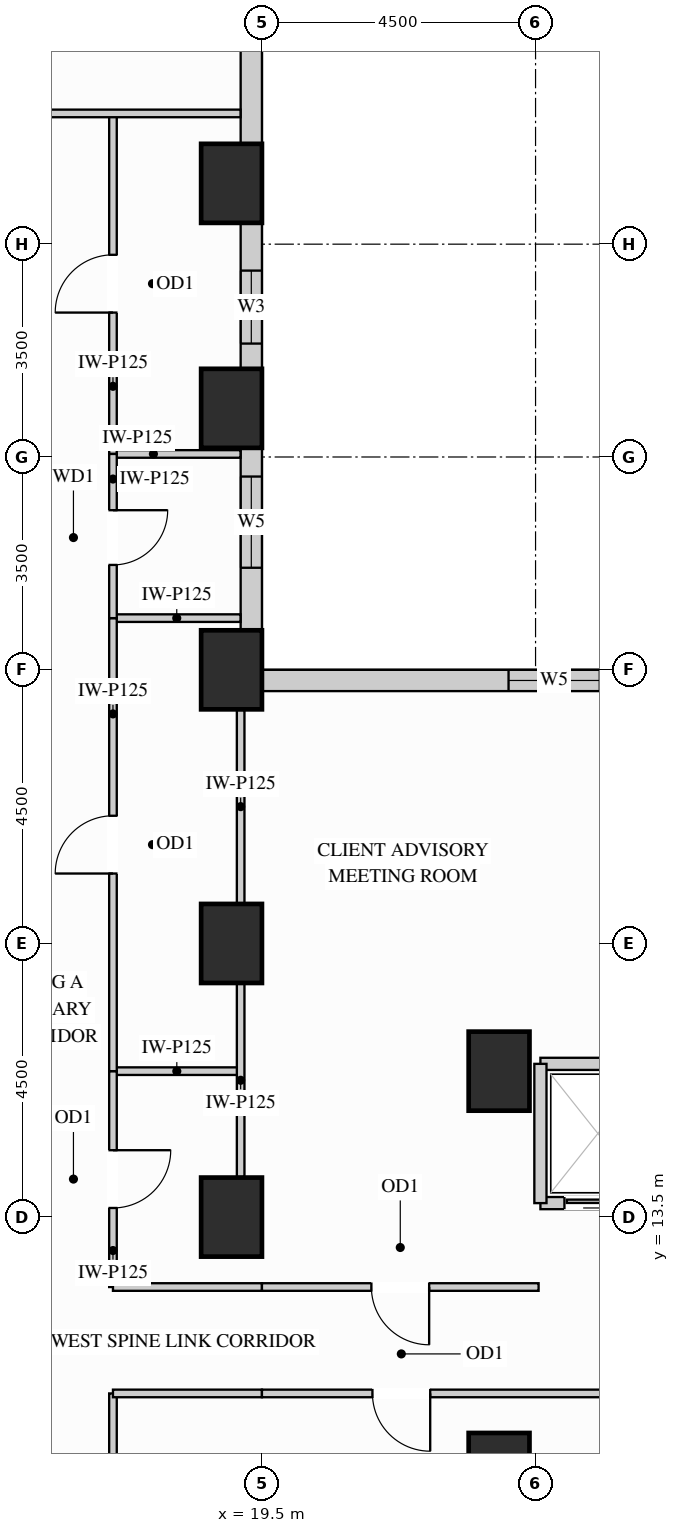
"""IFC4 building model, lengths in metres.
Left out: names, types, materials, properties, quantities, classifications, styles, units other than length and angle.
Written with IfcOpenShell. Run it as: python <this file> out.ifc"""

import sys

from ifc_helpers import new_model, si_unit, direction, frame, frame_2d, origin, origin_2d, place, context, subcontext, project, spatial, rectangle, extrude, source, transform, mapped, element, fill, save


model = new_model("IFC4")
c1 = context("Model", 3, precision=1e-05, world=origin(), true_north=direction((0.0, 1.0)))
c2 = subcontext(c1, "Body", "Model", "MODEL_VIEW")
j1 = project(units=[si_unit("LENGTHUNIT", "METRE"), si_unit("PLANEANGLEUNIT", "RADIAN")], contexts=[c1])
p1 = place(None, origin())
s1 = spatial("IfcSite", under=j1, at=p1, CompositionType="ELEMENT")
p2 = place(p1, origin())
s2 = spatial("IfcBuilding", under=s1, at=p2, CompositionType="ELEMENT")
p3 = place(p2, frame((0.0, 0.0, 62.1)))
s3 = spatial("IfcBuildingStorey", under=s2, at=p3, CompositionType="ELEMENT", Elevation=62.1)
m1 = source(origin(), c2, "Body", "SweptSolid", [
    extrude(rectangle(XDim=1.0, YDim=1.3, at=origin_2d()), origin(), (0.0, 0.0, 1.0), 3.38),
])
for number, where, z_axis, x_axis in (
    (1, (19.0, 13.5, 0.0), (0.0, 0.0, 1.0), (1.0, 0.0, 0.0)),
    (2, (19.0, 18.0, 0.0), (0.0, 0.0, 1.0), (1.0, 0.0, 0.0)),
    (3, (19.0, 22.5, 0.0), (0.0, 0.0, 1.0), (1.0, 0.0, 0.0)),
    (4, (19.0, 26.8, 0.0), (0.0, 0.0, 1.0), (1.0, 0.0, 0.0)),
    (5, (19.0, 30.5, 0.0), (0.0, 0.0, 1.0), (1.0, 0.0, 0.0)),
    (6, (23.4, 15.9, 0.0), (0.0, 0.0, 1.0), (1.0, 0.0, 0.0)),
    (7, (23.4, 9.3, 0.0), (0.0, 0.0, 1.0), (1.0, 0.0, 0.0)),
):
    element("IfcColumn", number, at=place(p3, frame(where, z_axis=z_axis, x_axis=x_axis)), inside=s3, PredefinedType="COLUMN", context=c2, shape_type="MappedRepresentation", body=[
        mapped(m1, transform((0.0, 0.0, 0.0), x_axis=(1.0, 0.0, 0.0), y_axis=(0.0, 1.0, 0.0), z_axis=(0.0, 0.0, 1.0))),
    ])
p4 = place(p3, frame((34.352, 22.325, 0.0), z_axis=(0.0, 0.0, 1.0), x_axis=(-1.0, 0.0, 0.0)))
e8 = element("IfcWall", 8, at=p4, inside=s3, PredefinedType="SOLIDWALL", context=c2, shape_type="SweptSolid", body=[
    extrude(rectangle(XDim=14.854, YDim=0.35, at=frame_2d((7.427, 0.0))), origin(), (0.0, 0.0, 1.0), 3.365),
])
p5 = place(p4, frame((4.058, 0.0, 0.78)))
e9 = element("IfcOpeningElement", 9, at=p5, cuts=e8, PredefinedType="OPENING", context=c2, shape_type="SweptSolid", body=[
    extrude(rectangle(XDim=1.5, YDim=2.0, at=frame_2d((0.75, 1.0))), frame((0.0, 0.185, 0.0), z_axis=(0.0, -1.0, 0.0), x_axis=(1.0, 0.0, 0.0)), (0.0, 0.0, 1.0), 0.37),
])
p6 = place(p4, frame((9.296, 0.0, 0.78)))
e10 = element("IfcOpeningElement", 10, at=p6, cuts=e8, PredefinedType="OPENING", context=c2, shape_type="SweptSolid", body=[
    extrude(rectangle(XDim=1.5, YDim=2.0, at=frame_2d((0.75, 1.0))), frame((0.0, 0.185, 0.0), z_axis=(0.0, -1.0, 0.0), x_axis=(1.0, 0.0, 0.0)), (0.0, 0.0, 1.0), 0.37),
])
p7 = place(p3, frame((19.325, 23.148, 0.0), z_axis=(0.0, 0.0, 1.0), x_axis=(0.0, 1.0, 0.0)))
e11 = element("IfcWall", 11, at=p7, inside=s3, PredefinedType="SOLIDWALL", context=c2, shape_type="SweptSolid", body=[
    extrude(rectangle(XDim=3.004, YDim=0.35, at=frame_2d((1.502, 0.0))), origin(), (0.0, 0.0, 1.0), 2.51),
])
p8 = place(p7, frame((1.031, 0.0, 0.78)))
e12 = element("IfcOpeningElement", 12, at=p8, cuts=e11, PredefinedType="OPENING", context=c2, shape_type="SweptSolid", body=[
    extrude(rectangle(XDim=1.5, YDim=1.55, at=frame_2d((0.75, 0.775))), frame((0.0, 0.185, 0.0), z_axis=(0.0, -1.0, 0.0), x_axis=(1.0, 0.0, 0.0)), (0.0, 0.0, 1.0), 0.37),
])
p9 = place(p3, frame((19.325, 27.448, 0.0), z_axis=(0.0, 0.0, 1.0), x_axis=(0.0, 1.0, 0.0)))
e13 = element("IfcWall", 13, at=p9, inside=s3, PredefinedType="SOLIDWALL", context=c2, shape_type="SweptSolid", body=[
    extrude(rectangle(XDim=2.404, YDim=0.35, at=frame_2d((1.202, 0.0))), origin(), (0.0, 0.0, 1.0), 2.51),
])
p10 = place(p9, frame((0.417, 0.0, 0.78)))
e14 = element("IfcOpeningElement", 14, at=p10, cuts=e13, PredefinedType="OPENING", context=c2, shape_type="SweptSolid", body=[
    extrude(rectangle(XDim=1.2, YDim=1.55, at=frame_2d((0.6, 0.775))), frame((0.0, 0.185, 0.0), z_axis=(0.0, -1.0, 0.0), x_axis=(1.0, 0.0, 0.0)), (0.0, 0.0, 1.0), 0.37),
])
m2 = source(origin(), c2, "Body", "SweptSolid", [
    extrude(rectangle(XDim=3.204, YDim=0.35, at=frame_2d((1.602, 0.0))), origin(), (0.0, 0.0, 1.0), 2.51),
])
p11 = place(p3, frame((19.325, 31.148, 0.0), z_axis=(0.0, 0.0, 1.0), x_axis=(0.0, 1.0, 0.0)))
e15 = element("IfcWall", 15, at=p11, inside=s3, PredefinedType="SOLIDWALL", context=c2, shape_type="MappedRepresentation", body=[
    mapped(m2, transform((0.0, 0.0, 0.0), x_axis=(1.0, 0.0, 0.0), y_axis=(0.0, 1.0, 0.0), z_axis=(0.0, 0.0, 1.0))),
])
m3 = source(origin(), c2, "Body", "SweptSolid", [
    extrude(rectangle(XDim=2.1, YDim=0.125, at=frame_2d((1.05, 0.0))), origin(), (0.0, 0.0, 1.0), 3.365),
])
p12 = place(p3, frame((17.05, 15.9, 0.0), z_axis=(0.0, 0.0, 1.0), x_axis=(1.0, 0.0, 0.0)))
e16 = element("IfcWall", 16, at=p12, inside=s3, PredefinedType="PARTITIONING", context=c2, shape_type="MappedRepresentation", body=[
    mapped(m3, transform((0.0, 0.0, 0.0), x_axis=(1.0, 0.0, 0.0), y_axis=(0.0, 1.0, 0.0), z_axis=(0.0, 0.0, 1.0))),
])
m4 = source(origin(), c2, "Body", "SweptSolid", [
    extrude(rectangle(XDim=2.098, YDim=0.125, at=frame_2d((1.049, 0.0))), origin(), (0.0, 0.0, 1.0), 3.365),
])
for number, where, z_axis, x_axis in (
    (17, (17.05, 23.35, 0.0), (0.0, 0.0, 1.0), (1.0, 0.0, 0.0)),
    (18, (17.05, 26.05, 0.0), (0.0, 0.0, 1.0), (1.0, 0.0, 0.0)),
):
    element("IfcWall", number, at=place(p3, frame(where, z_axis=z_axis, x_axis=x_axis)), inside=s3, PredefinedType="PARTITIONING", context=c2, shape_type="MappedRepresentation", body=[
        mapped(m4, transform((0.0, 0.0, 0.0), x_axis=(1.0, 0.0, 0.0), y_axis=(0.0, 1.0, 0.0), z_axis=(0.0, 0.0, 1.0))),
    ])
m5 = source(origin(), c2, "Body", "SweptSolid", [
    extrude(rectangle(XDim=3.18, YDim=0.125, at=frame_2d((1.59, 0.0))), origin(), (0.0, 0.0, 1.0), 2.67),
])
for number, where, z_axis, x_axis in (
    (19, (19.15, 14.16, 0.0), (0.0, 0.0, 1.0), (0.0, 1.0, 0.0)),
    (20, (19.15, 18.66, 0.0), (0.0, 0.0, 1.0), (0.0, 1.0, 0.0)),
):
    element("IfcWall", number, at=place(p3, frame(where, z_axis=z_axis, x_axis=x_axis)), inside=s3, PredefinedType="PARTITIONING", context=c2, shape_type="MappedRepresentation", body=[
        mapped(m5, transform((0.0, 0.0, 0.0), x_axis=(1.0, 0.0, 0.0), y_axis=(0.0, 1.0, 0.0), z_axis=(0.0, 0.0, 1.0))),
    ])
p13 = place(p3, frame((17.05, 12.35, 0.0), z_axis=(0.0, 0.0, 1.0), x_axis=(0.0, 1.0, 0.0)))
e21 = element("IfcWall", 21, at=p13, inside=s3, PredefinedType="PARTITIONING", context=c2, shape_type="SweptSolid", body=[
    extrude(rectangle(XDim=3.55, YDim=0.125, at=frame_2d((1.775, 0.0))), origin(), (0.0, 0.0, 1.0), 3.365),
])
p14 = place(p13, frame((1.3, 0.0, 0.0)))
e22 = element("IfcOpeningElement", 22, at=p14, cuts=e21, PredefinedType="OPENING", context=c2, shape_type="SweptSolid", body=[
    extrude(rectangle(XDim=0.95, YDim=2.15, at=frame_2d((0.475, 1.075))), frame((0.0, 0.073, 0.0), z_axis=(0.0, -1.0, 0.0), x_axis=(1.0, 0.0, 0.0)), (0.0, 0.0, 1.0), 0.145),
])
p15 = place(p3, frame((17.05, 15.9, 0.0), z_axis=(0.0, 0.0, 1.0), x_axis=(0.0, 1.0, 0.0)))
e23 = element("IfcWall", 23, at=p15, inside=s3, PredefinedType="PARTITIONING", context=c2, shape_type="SweptSolid", body=[
    extrude(rectangle(XDim=7.45, YDim=0.125, at=frame_2d((3.725, 0.0))), origin(), (0.0, 0.0, 1.0), 3.365),
])
p16 = place(p15, frame((3.25, 0.0, 0.0)))
e24 = element("IfcOpeningElement", 24, at=p16, cuts=e23, PredefinedType="OPENING", context=c2, shape_type="SweptSolid", body=[
    extrude(rectangle(XDim=0.95, YDim=2.15, at=frame_2d((0.475, 1.075))), frame((0.0, 0.073, 0.0), z_axis=(0.0, -1.0, 0.0), x_axis=(1.0, 0.0, 0.0)), (0.0, 0.0, 1.0), 0.145),
])
p17 = place(p3, frame((17.05, 26.05, 0.0), z_axis=(0.0, 0.0, 1.0), x_axis=(0.0, 1.0, 0.0)))
e25 = element("IfcWall", 25, at=p17, inside=s3, PredefinedType="PARTITIONING", context=c2, shape_type="SweptSolid", body=[
    extrude(rectangle(XDim=5.6, YDim=0.125, at=frame_2d((2.8, 0.0))), origin(), (0.0, 0.0, 1.0), 3.365),
])
p18 = place(p17, frame((2.325, 0.0, 0.0)))
e26 = element("IfcOpeningElement", 26, at=p18, cuts=e25, PredefinedType="OPENING", context=c2, shape_type="SweptSolid", body=[
    extrude(rectangle(XDim=0.95, YDim=2.15, at=frame_2d((0.475, 1.075))), frame((0.0, 0.073, 0.0), z_axis=(0.0, -1.0, 0.0), x_axis=(1.0, 0.0, 0.0)), (0.0, 0.0, 1.0), 0.145),
])
p19 = place(p3, frame((17.05, 6.15, 0.0), z_axis=(0.0, 0.0, 1.0), x_axis=(0.0, 1.0, 0.0)))
e27 = element("IfcWall", 27, at=p19, inside=s3, PredefinedType="PARTITIONING", context=c2, shape_type="SweptSolid", body=[
    extrude(rectangle(XDim=4.45, YDim=0.125, at=frame_2d((2.225, 0.0))), origin(), (0.0, 0.0, 1.0), 3.365),
])
p20 = place(p19, frame((1.75, 0.0, 0.0)))
e28 = element("IfcOpeningElement", 28, at=p20, cuts=e27, PredefinedType="OPENING", context=c2, shape_type="SweptSolid", body=[
    extrude(rectangle(XDim=0.95, YDim=2.15, at=frame_2d((0.475, 1.075))), frame((0.0, 0.073, 0.0), z_axis=(0.0, -1.0, 0.0), x_axis=(1.0, 0.0, 0.0)), (0.0, 0.0, 1.0), 0.145),
])
p21 = place(p3, frame((17.05, 23.35, 0.0), z_axis=(0.0, 0.0, 1.0), x_axis=(0.0, 1.0, 0.0)))
e29 = element("IfcWall", 29, at=p21, inside=s3, PredefinedType="PARTITIONING", context=c2, shape_type="SweptSolid", body=[
    extrude(rectangle(XDim=2.7, YDim=0.125, at=frame_2d((1.35, 0.0))), origin(), (0.0, 0.0, 1.0), 3.365),
])
p22 = place(p21, frame((0.875, 0.0, 0.0)))
e30 = element("IfcOpeningElement", 30, at=p22, cuts=e29, PredefinedType="OPENING", context=c2, shape_type="SweptSolid", body=[
    extrude(rectangle(XDim=0.9, YDim=2.15, at=frame_2d((0.45, 1.075))), frame((0.0, 0.073, 0.0), z_axis=(0.0, -1.0, 0.0), x_axis=(1.0, 0.0, 0.0)), (0.0, 0.0, 1.0), 0.145),
])
m6 = source(origin(), c2, "Body", "SweptSolid", [
    extrude(rectangle(XDim=5.798, YDim=0.125, at=frame_2d((2.899, 0.0))), origin(), (0.0, 0.0, 1.0), 2.828),
])
p23 = place(p3, frame((13.35, 31.65, 0.0), z_axis=(0.0, 0.0, 1.0), x_axis=(1.0, 0.0, 0.0)))
e31 = element("IfcWall", 31, at=p23, inside=s3, PredefinedType="PARTITIONING", context=c2, shape_type="MappedRepresentation", body=[
    mapped(m6, transform((0.0, 0.0, 0.0), x_axis=(1.0, 0.0, 0.0), y_axis=(0.0, 1.0, 0.0), z_axis=(0.0, 0.0, 1.0))),
])
m7 = source(origin(), c2, "Body", "SweptSolid", [
    extrude(rectangle(XDim=2.45, YDim=0.125, at=frame_2d((1.225, 0.0))), origin(), (0.0, 0.0, 1.0), 3.365),
])
p24 = place(p3, frame((17.05, 12.35, 0.0), z_axis=(0.0, 0.0, 1.0), x_axis=(1.0, 0.0, 0.0)))
e32 = element("IfcWall", 32, at=p24, inside=s3, PredefinedType="PARTITIONING", context=c2, shape_type="MappedRepresentation", body=[
    mapped(m7, transform((0.0, 0.0, 0.0), x_axis=(1.0, 0.0, 0.0), y_axis=(0.0, 1.0, 0.0), z_axis=(0.0, 0.0, 1.0))),
])
p25 = place(p3, frame((19.5, 12.35, 0.0), z_axis=(0.0, 0.0, 1.0), x_axis=(1.0, 0.0, 0.0)))
e33 = element("IfcWall", 33, at=p25, inside=s3, PredefinedType="PARTITIONING", context=c2, shape_type="SweptSolid", body=[
    extrude(rectangle(XDim=4.55, YDim=0.125, at=frame_2d((2.275, 0.0))), origin(), (0.0, 0.0, 1.0), 3.365),
])
p26 = place(p25, frame((1.8, 0.0, 0.0)))
e34 = element("IfcOpeningElement", 34, at=p26, cuts=e33, PredefinedType="OPENING", context=c2, shape_type="SweptSolid", body=[
    extrude(rectangle(XDim=0.95, YDim=2.15, at=frame_2d((0.475, 1.075))), frame((0.0, 0.073, 0.0), z_axis=(0.0, -1.0, 0.0), x_axis=(1.0, 0.0, 0.0)), (0.0, 0.0, 1.0), 0.145),
])
p27 = place(p3, frame((17.05, 10.6, 0.0), z_axis=(0.0, 0.0, 1.0), x_axis=(1.0, 0.0, 0.0)))
e35 = element("IfcWall", 35, at=p27, inside=s3, PredefinedType="PARTITIONING", context=c2, shape_type="MappedRepresentation", body=[
    mapped(m7, transform((0.0, 0.0, 0.0), x_axis=(1.0, 0.0, 0.0), y_axis=(0.0, 1.0, 0.0), z_axis=(0.0, 0.0, 1.0))),
])
p28 = place(p3, frame((19.5, 10.6, 0.0), z_axis=(0.0, 0.0, 1.0), x_axis=(1.0, 0.0, 0.0)))
e36 = element("IfcWall", 36, at=p28, inside=s3, PredefinedType="PARTITIONING", context=c2, shape_type="SweptSolid", body=[
    extrude(rectangle(XDim=7.45, YDim=0.125, at=frame_2d((3.725, 0.0))), origin(), (0.0, 0.0, 1.0), 3.365),
])
p29 = place(p28, frame((1.817, 0.0, 0.0)))
e37 = element("IfcOpeningElement", 37, at=p29, cuts=e36, PredefinedType="OPENING", context=c2, shape_type="SweptSolid", body=[
    extrude(rectangle(XDim=0.95, YDim=2.15, at=frame_2d((0.475, 1.075))), frame((0.0, 0.073, 0.0), z_axis=(0.0, -1.0, 0.0), x_axis=(1.0, 0.0, 0.0)), (0.0, 0.0, 1.0), 0.145),
])
m8 = source(origin(), c2, "Body", "SweptSolid", [
    extrude(rectangle(XDim=1.89, YDim=0.2, at=frame_2d((0.945, 0.0))), origin(), (0.0, 0.0, 1.0), 2.67),
])
p30 = place(p3, frame((24.08, 16.02, 0.0), z_axis=(0.0, 0.0, 1.0), x_axis=(1.0, 0.0, 0.0)))
e38 = element("IfcWall", 38, at=p30, inside=s3, PredefinedType="PARTITIONING", context=c2, shape_type="MappedRepresentation", body=[
    mapped(m8, transform((0.0, 0.0, 0.0), x_axis=(1.0, 0.0, 0.0), y_axis=(0.0, 1.0, 0.0), z_axis=(0.0, 0.0, 1.0))),
])
p31 = place(p3, frame((24.08, 13.73, 0.0), z_axis=(0.0, 0.0, 1.0), x_axis=(1.0, 0.0, 0.0)))
e39 = element("IfcWall", 39, at=p31, inside=s3, PredefinedType="PARTITIONING", context=c2, shape_type="SweptSolid", body=[
    extrude(rectangle(XDim=1.89, YDim=0.2, at=frame_2d((0.945, 0.0))), origin(), (0.0, 0.0, 1.0), 2.446),
])
p32 = place(p31, frame((0.395, 0.0, 0.0)))
e40 = element("IfcOpeningElement", 40, at=p32, cuts=e39, PredefinedType="OPENING", context=c2, shape_type="SweptSolid", body=[
    extrude(rectangle(XDim=1.1, YDim=2.2, at=frame_2d((0.55, 1.1))), frame((0.0, 0.11, 0.0), z_axis=(0.0, -1.0, 0.0), x_axis=(1.0, 0.0, 0.0)), (0.0, 0.0, 1.0), 0.22),
])
m9 = source(origin(), c2, "Body", "SweptSolid", [
    extrude(rectangle(XDim=2.29, YDim=0.2, at=frame_2d((1.145, 0.0))), origin(), (0.0, 0.0, 1.0), 3.365),
])
p33 = place(p3, frame((24.08, 13.73, 0.0), z_axis=(0.0, 0.0, 1.0), x_axis=(0.0, 1.0, 0.0)))
e41 = element("IfcWall", 41, at=p33, inside=s3, PredefinedType="PARTITIONING", context=c2, shape_type="MappedRepresentation", body=[
    mapped(m9, transform((0.0, 0.0, 0.0), x_axis=(1.0, 0.0, 0.0), y_axis=(0.0, 1.0, 0.0), z_axis=(0.0, 0.0, 1.0))),
])
m10 = source(origin(), c2, "Body", "SweptSolid", [
    extrude(rectangle(XDim=1.1, YDim=2.2, at=frame_2d((0.55, 1.1))), frame((0.0, 0.025, 0.0), z_axis=(0.0, -1.0, 0.0), x_axis=(1.0, 0.0, 0.0)), (0.0, 0.0, 1.0), 0.05),
])
p34 = place(p32, origin())
e42 = element("IfcDoor", 42, at=p34, inside=s3, OperationType="SLIDING_TO_LEFT", PredefinedType="DOOR", context=c2, shape_type="MappedRepresentation", body=[
    mapped(m10, transform((0.0, 0.0, 0.0), x_axis=(1.0, 0.0, 0.0), y_axis=(0.0, 1.0, 0.0), z_axis=(0.0, 0.0, 1.0))),
])
fill(e40, e42)
m11 = source(origin(), c2, "Body", "SweptSolid", [
    extrude(rectangle(XDim=0.95, YDim=2.15, at=frame_2d((0.475, 1.075))), frame((0.0, 0.025, 0.0), z_axis=(0.0, -1.0, 0.0), x_axis=(1.0, 0.0, 0.0)), (0.0, 0.0, 1.0), 0.05),
])
p35 = place(p14, origin())
e43 = element("IfcDoor", 43, at=p35, inside=s3, OperationType="SINGLE_SWING_RIGHT", PredefinedType="DOOR", context=c2, shape_type="MappedRepresentation", body=[
    mapped(m11, transform((0.0, 0.0, 0.0), x_axis=(1.0, 0.0, 0.0), y_axis=(0.0, 1.0, 0.0), z_axis=(0.0, 0.0, 1.0))),
])
fill(e22, e43)
p36 = place(p16, origin())
e44 = element("IfcDoor", 44, at=p36, inside=s3, OperationType="SINGLE_SWING_LEFT", PredefinedType="DOOR", context=c2, shape_type="MappedRepresentation", body=[
    mapped(m11, transform((0.0, 0.0, 0.0), x_axis=(1.0, 0.0, 0.0), y_axis=(0.0, 1.0, 0.0), z_axis=(0.0, 0.0, 1.0))),
])
fill(e24, e44)
p37 = place(p18, origin())
e45 = element("IfcDoor", 45, at=p37, inside=s3, OperationType="SINGLE_SWING_LEFT", PredefinedType="DOOR", context=c2, shape_type="MappedRepresentation", body=[
    mapped(m11, transform((0.0, 0.0, 0.0), x_axis=(1.0, 0.0, 0.0), y_axis=(0.0, 1.0, 0.0), z_axis=(0.0, 0.0, 1.0))),
])
fill(e26, e45)
p38 = place(p26, origin())
e46 = element("IfcDoor", 46, at=p38, inside=s3, OperationType="SINGLE_SWING_RIGHT", PredefinedType="DOOR", context=c2, shape_type="MappedRepresentation", body=[
    mapped(m11, transform((0.0, 0.0, 0.0), x_axis=(1.0, 0.0, 0.0), y_axis=(0.0, 1.0, 0.0), z_axis=(0.0, 0.0, 1.0))),
])
fill(e34, e46)
p39 = place(p29, origin())
e47 = element("IfcDoor", 47, at=p39, inside=s3, OperationType="SINGLE_SWING_RIGHT", PredefinedType="DOOR", context=c2, shape_type="MappedRepresentation", body=[
    mapped(m11, transform((0.0, 0.0, 0.0), x_axis=(1.0, 0.0, 0.0), y_axis=(0.0, 1.0, 0.0), z_axis=(0.0, 0.0, 1.0))),
])
fill(e37, e47)
m12 = source(origin(), c2, "Body", "SweptSolid", [
    extrude(rectangle(XDim=0.9, YDim=2.15, at=frame_2d((0.45, 1.075))), frame((0.0, 0.025, 0.0), z_axis=(0.0, -1.0, 0.0), x_axis=(1.0, 0.0, 0.0)), (0.0, 0.0, 1.0), 0.05),
])
p40 = place(p22, origin())
e48 = element("IfcDoor", 48, at=p40, inside=s3, OperationType="SINGLE_SWING_RIGHT", PredefinedType="DOOR", context=c2, shape_type="MappedRepresentation", body=[
    mapped(m12, transform((0.0, 0.0, 0.0), x_axis=(1.0, 0.0, 0.0), y_axis=(0.0, 1.0, 0.0), z_axis=(0.0, 0.0, 1.0))),
])
fill(e30, e48)
m13 = source(origin(), c2, "Body", "SweptSolid", [
    extrude(rectangle(XDim=1.2, YDim=1.55, at=frame_2d((0.6, 0.775))), frame((0.0, 0.03, 0.0), z_axis=(0.0, -1.0, 0.0), x_axis=(1.0, 0.0, 0.0)), (0.0, 0.0, 1.0), 0.06),
])
p41 = place(p10, origin())
e49 = element("IfcWindow", 49, at=p41, inside=s3, PartitioningType="SINGLE_PANEL", PredefinedType="WINDOW", context=c2, shape_type="MappedRepresentation", body=[
    mapped(m13, transform((0.0, 0.0, 0.0), x_axis=(1.0, 0.0, 0.0), y_axis=(0.0, 1.0, 0.0), z_axis=(0.0, 0.0, 1.0))),
])
fill(e14, e49)
m14 = source(origin(), c2, "Body", "SweptSolid", [
    extrude(rectangle(XDim=1.5, YDim=2.0, at=frame_2d((0.75, 1.0))), frame((0.0, 0.03, 0.0), z_axis=(0.0, -1.0, 0.0), x_axis=(1.0, 0.0, 0.0)), (0.0, 0.0, 1.0), 0.06),
])
p42 = place(p6, origin())
e50 = element("IfcWindow", 50, at=p42, inside=s3, PartitioningType="SINGLE_PANEL", PredefinedType="WINDOW", context=c2, shape_type="MappedRepresentation", body=[
    mapped(m14, transform((0.0, 0.0, 0.0), x_axis=(1.0, 0.0, 0.0), y_axis=(0.0, 1.0, 0.0), z_axis=(0.0, 0.0, 1.0))),
])
fill(e10, e50)
m15 = source(origin(), c2, "Body", "SweptSolid", [
    extrude(rectangle(XDim=1.5, YDim=1.55, at=frame_2d((0.75, 0.775))), frame((0.0, 0.03, 0.0), z_axis=(0.0, -1.0, 0.0), x_axis=(1.0, 0.0, 0.0)), (0.0, 0.0, 1.0), 0.06),
])
p43 = place(p8, origin())
e51 = element("IfcWindow", 51, at=p43, inside=s3, PartitioningType="SINGLE_PANEL", PredefinedType="WINDOW", context=c2, shape_type="MappedRepresentation", body=[
    mapped(m15, transform((0.0, 0.0, 0.0), x_axis=(1.0, 0.0, 0.0), y_axis=(0.0, 1.0, 0.0), z_axis=(0.0, 0.0, 1.0))),
])
fill(e12, e51)
save(model, sys.argv[1])
